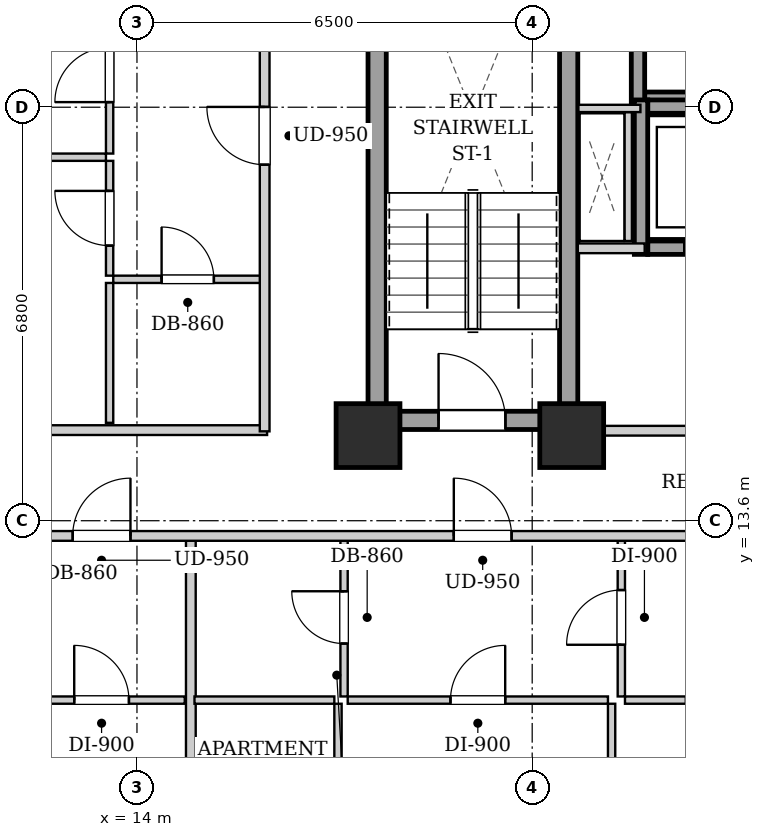
"""IFC4 building model, lengths in metres.
Left out: names, types, materials, properties, quantities, classifications, styles, units other than length and angle.
Written with IfcOpenShell. Run it as: python <this file> out.ifc"""

import sys

from ifc_helpers import new_model, si_unit, direction, frame, frame_2d, origin, origin_2d, place, context, subcontext, project, spatial, rectangle, extrude, element, fill, save


model = new_model("IFC4")
c1 = context("Model", 3, precision=1e-05, world=origin(), true_north=direction((0.0, 1.0)))
c2 = subcontext(c1, "Body", "Model", "MODEL_VIEW")
j1 = project(units=[si_unit("LENGTHUNIT", "METRE"), si_unit("PLANEANGLEUNIT", "RADIAN")], contexts=[c1])
p1 = place(None, origin())
s1 = spatial("IfcSite", under=j1, at=p1, CompositionType="ELEMENT")
p2 = place(p1, origin())
s2 = spatial("IfcBuilding", under=s1, at=p2, CompositionType="ELEMENT")
p3 = place(p2, frame((0.0, 0.0, 75.1)))
s3 = spatial("IfcBuildingStorey", under=s2, at=p3, CompositionType="ELEMENT", Elevation=75.1)
for number, where, z_axis, x_axis in (
    (1, (17.8, 15.0, 0.0), (0.0, 0.0, 1.0), (1.0, 0.0, 0.0)),
    (2, (21.15, 15.0, 0.0), (0.0, 0.0, 1.0), (1.0, 0.0, 0.0)),
):
    element("IfcColumn", number, at=place(p3, frame(where, z_axis=z_axis, x_axis=x_axis)), inside=s3, PredefinedType="COLUMN", context=c2, shape_type="SweptSolid", body=[
        extrude(rectangle(XDim=1.05, YDim=1.05, at=origin_2d()), origin(), (0.0, 0.0, 1.0), 3.2),
    ])
for number, where, z_axis, x_axis in (
    (3, (17.95, 15.1, 0.0), (0.0, 0.0, 1.0), (0.0, 1.0, 0.0)),
    (4, (21.1, 15.1, 0.0), (0.0, 0.0, 1.0), (0.0, 1.0, 0.0)),
):
    element("IfcWall", number, at=place(p3, frame(where, z_axis=z_axis, x_axis=x_axis)), inside=s3, PredefinedType="SHEAR", context=c2, shape_type="SweptSolid", body=[
        extrude(rectangle(XDim=9.0, YDim=0.3, at=frame_2d((4.5, 0.0))), origin(), (0.0, 0.0, 1.0), 2.94),
    ])
p4 = place(p3, frame((18.1, 15.25, 0.0), z_axis=(0.0, 0.0, 1.0), x_axis=(1.0, 0.0, 0.0)))
e5 = element("IfcWall", 5, at=p4, inside=s3, PredefinedType="SHEAR", context=c2, shape_type="SweptSolid", body=[
    extrude(rectangle(XDim=2.85, YDim=0.3, at=frame_2d((1.425, 0.0))), origin(), (0.0, 0.0, 1.0), 2.94),
])
p5 = place(p4, frame((0.86, 0.0, 0.0)))
e6 = element("IfcOpeningElement", 6, at=p5, cuts=e5, PredefinedType="OPENING", context=c2, shape_type="SweptSolid", body=[
    extrude(rectangle(XDim=1.1, YDim=2.05, at=frame_2d((0.55, 1.025))), frame((0.0, 0.16, 0.0), z_axis=(0.0, -1.0, 0.0), x_axis=(1.0, 0.0, 0.0)), (0.0, 0.0, 1.0), 0.32),
])
p6 = place(p3, frame((22.35, 20.54, 0.0), z_axis=(0.0, 0.0, 1.0), x_axis=(1.0, 0.0, 0.0)))
e7 = element("IfcWall", 7, at=p6, inside=s3, PredefinedType="SHEAR", context=c2, shape_type="SweptSolid", body=[
    extrude(rectangle(XDim=1.9, YDim=0.22, at=frame_2d((0.95, 0.0))), origin(), (0.0, 0.0, 1.0), 2.94),
])
p7 = place(p3, frame((22.24, 20.43, 0.0), z_axis=(0.0, 0.0, 1.0), x_axis=(0.0, 1.0, 0.0)))
e8 = element("IfcWall", 8, at=p7, inside=s3, PredefinedType="SHEAR", context=c2, shape_type="SweptSolid", body=[
    extrude(rectangle(XDim=2.44, YDim=0.22, at=frame_2d((1.22, 0.0))), origin(), (0.0, 0.0, 1.0), 2.94),
])
p8 = place(p3, frame((22.4, 18.09, 0.0), z_axis=(0.0, 0.0, 1.0), x_axis=(1.0, 0.0, 0.0)))
e9 = element("IfcWall", 9, at=p8, inside=s3, PredefinedType="SHEAR", context=c2, shape_type="SweptSolid", body=[
    extrude(rectangle(XDim=2.4, YDim=0.22, at=frame_2d((1.2, 0.0))), origin(), (0.0, 0.0, 1.0), 2.94),
])
p9 = place(p8, frame((0.6, 0.0, 0.0)))
e10 = element("IfcOpeningElement", 10, at=p9, cuts=e9, PredefinedType="OPENING", context=c2, shape_type="SweptSolid", body=[
    extrude(rectangle(XDim=1.2, YDim=2.15, at=frame_2d((0.6, 1.075))), frame((0.0, 0.12, 0.0), z_axis=(0.0, -1.0, 0.0), x_axis=(1.0, 0.0, 0.0)), (0.0, 0.0, 1.0), 0.24),
])
p10 = place(p3, frame((22.4, 20.41, 0.0), z_axis=(0.0, 0.0, 1.0), x_axis=(1.0, 0.0, 0.0)))
e11 = element("IfcWall", 11, at=p10, inside=s3, PredefinedType="SHEAR", context=c2, shape_type="SweptSolid", body=[
    extrude(rectangle(XDim=2.4, YDim=0.22, at=frame_2d((1.2, 0.0))), origin(), (0.0, 0.0, 1.0), 2.94),
])
p11 = place(p3, frame((22.29, 17.98, 0.0), z_axis=(0.0, 0.0, 1.0), x_axis=(0.0, 1.0, 0.0)))
e12 = element("IfcWall", 12, at=p11, inside=s3, PredefinedType="SHEAR", context=c2, shape_type="SweptSolid", body=[
    extrude(rectangle(XDim=2.54, YDim=0.22, at=frame_2d((1.27, 0.0))), origin(), (0.0, 0.0, 1.0), 2.94),
])
p12 = place(p3, frame((21.25, 15.08, 0.0), z_axis=(0.0, 0.0, 1.0), x_axis=(1.0, 0.0, 0.0)))
e13 = element("IfcWall", 13, at=p12, inside=s3, PredefinedType="PARTITIONING", context=c2, shape_type="SweptSolid", body=[
    extrude(rectangle(XDim=8.5, YDim=0.16, at=frame_2d((4.25, 0.0))), origin(), (0.0, 0.0, 1.0), 2.309),
])
p13 = place(p12, frame((3.725, 0.0, 0.0)))
e14 = element("IfcOpeningElement", 14, at=p13, cuts=e13, PredefinedType="OPENING", context=c2, shape_type="SweptSolid", body=[
    extrude(rectangle(XDim=1.05, YDim=2.05, at=frame_2d((0.525, 1.025))), frame((0.0, 0.09, 0.0), z_axis=(0.0, -1.0, 0.0), x_axis=(1.0, 0.0, 0.0)), (0.0, 0.0, 1.0), 0.18),
])
p14 = place(p3, frame((21.25, 18.08, 0.0), z_axis=(0.0, 0.0, 1.0), x_axis=(1.0, 0.0, 0.0)))
e15 = element("IfcWall", 15, at=p14, inside=s3, PredefinedType="PARTITIONING", context=c2, shape_type="SweptSolid", body=[
    extrude(rectangle(XDim=1.1, YDim=0.16, at=frame_2d((0.55, 0.0))), origin(), (0.0, 0.0, 1.0), 2.94),
])
p15 = place(p3, frame((22.08, 18.2, 0.0), z_axis=(0.0, 0.0, 1.0), x_axis=(0.0, 1.0, 0.0)))
e16 = element("IfcWall", 16, at=p15, inside=s3, PredefinedType="PARTITIONING", context=c2, shape_type="SweptSolid", body=[
    extrude(rectangle(XDim=2.12, YDim=0.12, at=frame_2d((1.06, 0.0))), origin(), (0.0, 0.0, 1.0), 2.94),
])
p16 = place(p3, frame((22.28, 20.38, 0.0), z_axis=(0.0, 0.0, 1.0), x_axis=(-1.0, 0.0, 0.0)))
e17 = element("IfcWall", 17, at=p16, inside=s3, PredefinedType="PARTITIONING", context=c2, shape_type="SweptSolid", body=[
    extrude(rectangle(XDim=1.02, YDim=0.12, at=frame_2d((0.51, 0.0))), origin(), (0.0, 0.0, 1.0), 2.94),
])
p17 = place(p3, frame((7.78, 15.09, 0.0), z_axis=(0.0, 0.0, 1.0), x_axis=(1.0, 0.0, 0.0)))
e18 = element("IfcWall", 18, at=p17, inside=s3, PredefinedType="PARTITIONING", context=c2, shape_type="SweptSolid", body=[
    extrude(rectangle(XDim=8.36, YDim=0.16, at=frame_2d((4.18, 0.0))), origin(), (0.0, 0.0, 1.0), 2.309),
])
p18 = place(p3, frame((12.05, 10.65, 0.0), z_axis=(0.0, 0.0, 1.0), x_axis=(1.0, 0.0, 0.0)))
e19 = element("IfcWall", 19, at=p18, inside=s3, PredefinedType="PARTITIONING", context=c2, shape_type="SweptSolid", body=[
    extrude(rectangle(XDim=2.736, YDim=0.12, at=frame_2d((1.368, 0.0))), origin(), (0.0, 0.0, 1.0), 2.94),
])
p19 = place(p18, frame((0.918, 0.0, 0.0)))
e20 = element("IfcOpeningElement", 20, at=p19, cuts=e19, PredefinedType="OPENING", context=c2, shape_type="SweptSolid", body=[
    extrude(rectangle(XDim=0.9, YDim=2.05, at=frame_2d((0.45, 1.025))), frame((0.0, 0.07, 0.0), z_axis=(0.0, -1.0, 0.0), x_axis=(1.0, 0.0, 0.0)), (0.0, 0.0, 1.0), 0.14),
])
p20 = place(p3, frame((14.886, 2.26, 0.0), z_axis=(0.0, 0.0, 1.0), x_axis=(0.0, 1.0, 0.0)))
e21 = element("IfcWall", 21, at=p20, inside=s3, PredefinedType="PARTITIONING", context=c2, shape_type="SweptSolid", body=[
    extrude(rectangle(XDim=11.05, YDim=0.16, at=frame_2d((5.525, 0.0))), origin(), (0.0, 0.0, 1.0), 2.94),
])
p21 = place(p3, frame((17.406, 10.71, 0.0), z_axis=(0.0, 0.0, 1.0), x_axis=(0.0, 1.0, 0.0)))
e22 = element("IfcWall", 22, at=p21, inside=s3, PredefinedType="PARTITIONING", context=c2, shape_type="SweptSolid", body=[
    extrude(rectangle(XDim=2.6, YDim=0.12, at=frame_2d((1.3, 0.0))), origin(), (0.0, 0.0, 1.0), 2.94),
])
p22 = place(p21, frame((0.87, 0.0, 0.0)))
e23 = element("IfcOpeningElement", 23, at=p22, cuts=e22, PredefinedType="OPENING", context=c2, shape_type="SweptSolid", body=[
    extrude(rectangle(XDim=0.86, YDim=2.05, at=frame_2d((0.43, 1.025))), frame((0.0, 0.07, 0.0), z_axis=(0.0, -1.0, 0.0), x_axis=(1.0, 0.0, 0.0)), (0.0, 0.0, 1.0), 0.14),
])
p23 = place(p3, frame((14.946, 10.65, 0.0), z_axis=(0.0, 0.0, 1.0), x_axis=(1.0, 0.0, 0.0)))
e24 = element("IfcWall", 24, at=p23, inside=s3, PredefinedType="PARTITIONING", context=c2, shape_type="SweptSolid", body=[
    extrude(rectangle(XDim=2.3, YDim=0.12, at=frame_2d((1.15, 0.0))), origin(), (0.0, 0.0, 1.0), 2.94),
])
p24 = place(p3, frame((21.966, 10.71, 0.0), z_axis=(0.0, 0.0, 1.0), x_axis=(0.0, 1.0, 0.0)))
e25 = element("IfcWall", 25, at=p24, inside=s3, PredefinedType="PARTITIONING", context=c2, shape_type="SweptSolid", body=[
    extrude(rectangle(XDim=2.6, YDim=0.12, at=frame_2d((1.3, 0.0))), origin(), (0.0, 0.0, 1.0), 2.94),
])
p25 = place(p24, frame((0.85, 0.0, 0.0)))
e26 = element("IfcOpeningElement", 26, at=p25, cuts=e25, PredefinedType="OPENING", context=c2, shape_type="SweptSolid", body=[
    extrude(rectangle(XDim=0.9, YDim=2.05, at=frame_2d((0.45, 1.025))), frame((0.0, 0.07, 0.0), z_axis=(0.0, -1.0, 0.0), x_axis=(1.0, 0.0, 0.0)), (0.0, 0.0, 1.0), 0.14),
])
p26 = place(p3, frame((17.466, 10.65, 0.0), z_axis=(0.0, 0.0, 1.0), x_axis=(1.0, 0.0, 0.0)))
e27 = element("IfcWall", 27, at=p26, inside=s3, PredefinedType="PARTITIONING", context=c2, shape_type="SweptSolid", body=[
    extrude(rectangle(XDim=4.28, YDim=0.12, at=frame_2d((2.14, 0.0))), origin(), (0.0, 0.0, 1.0), 2.94),
])
p27 = place(p26, frame((1.69, 0.0, 0.0)))
e28 = element("IfcOpeningElement", 28, at=p27, cuts=e27, PredefinedType="OPENING", context=c2, shape_type="SweptSolid", body=[
    extrude(rectangle(XDim=0.9, YDim=2.05, at=frame_2d((0.45, 1.025))), frame((0.0, 0.07, 0.0), z_axis=(0.0, -1.0, 0.0), x_axis=(1.0, 0.0, 0.0)), (0.0, 0.0, 1.0), 0.14),
])
p28 = place(p3, frame((22.026, 10.65, 0.0), z_axis=(0.0, 0.0, 1.0), x_axis=(1.0, 0.0, 0.0)))
e29 = element("IfcWall", 29, at=p28, inside=s3, PredefinedType="PARTITIONING", context=c2, shape_type="SweptSolid", body=[
    extrude(rectangle(XDim=2.905, YDim=0.12, at=frame_2d((1.453, 0.0))), origin(), (0.0, 0.0, 1.0), 2.94),
])
p29 = place(p28, frame((1.003, 0.0, 0.0)))
e30 = element("IfcOpeningElement", 30, at=p29, cuts=e29, PredefinedType="OPENING", context=c2, shape_type="SweptSolid", body=[
    extrude(rectangle(XDim=0.9, YDim=2.05, at=frame_2d((0.45, 1.025))), frame((0.0, 0.07, 0.0), z_axis=(0.0, -1.0, 0.0), x_axis=(1.0, 0.0, 0.0)), (0.0, 0.0, 1.0), 0.14),
])
p30 = place(p3, frame((17.306, 2.43, 0.0), z_axis=(0.0, 0.0, 1.0), x_axis=(0.0, 1.0, 0.0)))
e31 = element("IfcWall", 31, at=p30, inside=s3, PredefinedType="PARTITIONING", context=c2, shape_type="SweptSolid", body=[
    extrude(rectangle(XDim=8.16, YDim=0.12, at=frame_2d((4.08, 0.0))), origin(), (0.0, 0.0, 1.0), 2.94),
])
p31 = place(p30, frame((3.63, 0.0, 0.0)))
e32 = element("IfcOpeningElement", 32, at=p31, cuts=e31, PredefinedType="OPENING", context=c2, shape_type="SweptSolid", body=[
    extrude(rectangle(XDim=0.9, YDim=2.05, at=frame_2d((0.45, 1.025))), frame((0.0, 0.07, 0.0), z_axis=(0.0, -1.0, 0.0), x_axis=(1.0, 0.0, 0.0)), (0.0, 0.0, 1.0), 0.14),
])
p32 = place(p3, frame((21.806, 0.28, 0.0), z_axis=(0.0, 0.0, 1.0), x_axis=(0.0, 1.0, 0.0)))
e33 = element("IfcWall", 33, at=p32, inside=s3, PredefinedType="PARTITIONING", context=c2, shape_type="SweptSolid", body=[
    extrude(rectangle(XDim=10.31, YDim=0.12, at=frame_2d((5.155, 0.0))), origin(), (0.0, 0.0, 1.0), 2.94),
])
p33 = place(p32, frame((4.69, 0.0, 0.0)))
e34 = element("IfcOpeningElement", 34, at=p33, cuts=e33, PredefinedType="OPENING", context=c2, shape_type="SweptSolid", body=[
    extrude(rectangle(XDim=0.9, YDim=2.05, at=frame_2d((0.45, 1.025))), frame((0.0, 0.07, 0.0), z_axis=(0.0, -1.0, 0.0), x_axis=(1.0, 0.0, 0.0)), (0.0, 0.0, 1.0), 0.14),
])
p34 = place(p3, frame((13.61, 17.57, 0.0), z_axis=(0.0, 0.0, 1.0), x_axis=(1.0, 0.0, 0.0)))
e35 = element("IfcWall", 35, at=p34, inside=s3, PredefinedType="PARTITIONING", context=c2, shape_type="SweptSolid", body=[
    extrude(rectangle(XDim=2.45, YDim=0.12, at=frame_2d((1.225, 0.0))), origin(), (0.0, 0.0, 1.0), 2.94),
])
p35 = place(p34, frame((0.795, 0.0, 0.0)))
e36 = element("IfcOpeningElement", 36, at=p35, cuts=e35, PredefinedType="OPENING", context=c2, shape_type="SweptSolid", body=[
    extrude(rectangle(XDim=0.86, YDim=2.05, at=frame_2d((0.43, 1.025))), frame((0.0, 0.07, 0.0), z_axis=(0.0, -1.0, 0.0), x_axis=(1.0, 0.0, 0.0)), (0.0, 0.0, 1.0), 0.14),
])
p36 = place(p3, frame((13.55, 15.21, 0.0), z_axis=(0.0, 0.0, 1.0), x_axis=(0.0, 1.0, 0.0)))
e37 = element("IfcWall", 37, at=p36, inside=s3, PredefinedType="PARTITIONING", context=c2, shape_type="SweptSolid", body=[
    extrude(rectangle(XDim=2.3, YDim=0.12, at=frame_2d((1.15, 0.0))), origin(), (0.0, 0.0, 1.0), 2.94),
])
p37 = place(p3, frame((13.55, 17.63, 0.0), z_axis=(0.0, 0.0, 1.0), x_axis=(0.0, 1.0, 0.0)))
e38 = element("IfcWall", 38, at=p37, inside=s3, PredefinedType="PARTITIONING", context=c2, shape_type="SweptSolid", body=[
    extrude(rectangle(XDim=1.888, YDim=0.12, at=frame_2d((0.944, 0.0))), origin(), (0.0, 0.0, 1.0), 2.94),
])
p38 = place(p37, frame((0.494, 0.0, 0.0)))
e39 = element("IfcOpeningElement", 39, at=p38, cuts=e38, PredefinedType="OPENING", context=c2, shape_type="SweptSolid", body=[
    extrude(rectangle(XDim=0.9, YDim=2.05, at=frame_2d((0.45, 1.025))), frame((0.0, 0.07, 0.0), z_axis=(0.0, -1.0, 0.0), x_axis=(1.0, 0.0, 0.0)), (0.0, 0.0, 1.0), 0.14),
])
p39 = place(p3, frame((13.55, 19.638, 0.0), z_axis=(0.0, 0.0, 1.0), x_axis=(0.0, 1.0, 0.0)))
e40 = element("IfcWall", 40, at=p39, inside=s3, PredefinedType="PARTITIONING", context=c2, shape_type="SweptSolid", body=[
    extrude(rectangle(XDim=2.592, YDim=0.12, at=frame_2d((1.296, 0.0))), origin(), (0.0, 0.0, 1.0), 2.94),
])
p40 = place(p39, frame((0.846, 0.0, 0.0)))
e41 = element("IfcOpeningElement", 41, at=p40, cuts=e40, PredefinedType="OPENING", context=c2, shape_type="SweptSolid", body=[
    extrude(rectangle(XDim=0.9, YDim=2.05, at=frame_2d((0.45, 1.025))), frame((0.0, 0.07, 0.0), z_axis=(0.0, -1.0, 0.0), x_axis=(1.0, 0.0, 0.0)), (0.0, 0.0, 1.0), 0.14),
])
p41 = place(p3, frame((9.93, 19.578, 0.0), z_axis=(0.0, 0.0, 1.0), x_axis=(1.0, 0.0, 0.0)))
e42 = element("IfcWall", 42, at=p41, inside=s3, PredefinedType="PARTITIONING", context=c2, shape_type="SweptSolid", body=[
    extrude(rectangle(XDim=3.56, YDim=0.12, at=frame_2d((1.78, 0.0))), origin(), (0.0, 0.0, 1.0), 2.94),
])
p42 = place(p41, frame((1.33, 0.0, 0.0)))
e43 = element("IfcOpeningElement", 43, at=p42, cuts=e42, PredefinedType="OPENING", context=c2, shape_type="SweptSolid", body=[
    extrude(rectangle(XDim=0.9, YDim=2.05, at=frame_2d((0.45, 1.025))), frame((0.0, 0.07, 0.0), z_axis=(0.0, -1.0, 0.0), x_axis=(1.0, 0.0, 0.0)), (0.0, 0.0, 1.0), 0.14),
])
p43 = place(p3, frame((10.05, 13.35, 0.0), z_axis=(0.0, 0.0, 1.0), x_axis=(1.0, 0.0, 0.0)))
e44 = element("IfcWall", 44, at=p43, inside=s3, PredefinedType="PARTITIONING", context=c2, shape_type="SweptSolid", body=[
    extrude(rectangle(XDim=30.8, YDim=0.16, at=frame_2d((15.4, 0.0))), origin(), (0.0, 0.0, 1.0), 2.94),
])
p44 = place(p43, frame((2.893, 0.0, 0.0)))
e45 = element("IfcOpeningElement", 45, at=p44, cuts=e44, PredefinedType="OPENING", context=c2, shape_type="SweptSolid", body=[
    extrude(rectangle(XDim=0.95, YDim=2.1, at=frame_2d((0.475, 1.05))), frame((0.0, 0.09, 0.0), z_axis=(0.0, -1.0, 0.0), x_axis=(1.0, 0.0, 0.0)), (0.0, 0.0, 1.0), 0.18),
])
p45 = place(p43, frame((9.161, 0.0, 0.0)))
e46 = element("IfcOpeningElement", 46, at=p45, cuts=e44, PredefinedType="OPENING", context=c2, shape_type="SweptSolid", body=[
    extrude(rectangle(XDim=0.95, YDim=2.1, at=frame_2d((0.475, 1.05))), frame((0.0, 0.09, 0.0), z_axis=(0.0, -1.0, 0.0), x_axis=(1.0, 0.0, 0.0)), (0.0, 0.0, 1.0), 0.18),
])
p46 = place(p43, frame((26.306, 0.0, 0.0)))
e47 = element("IfcOpeningElement", 47, at=p46, cuts=e44, PredefinedType="OPENING", context=c2, shape_type="SweptSolid", body=[
    extrude(rectangle(XDim=0.95, YDim=2.1, at=frame_2d((0.475, 1.05))), frame((0.0, 0.09, 0.0), z_axis=(0.0, -1.0, 0.0), x_axis=(1.0, 0.0, 0.0)), (0.0, 0.0, 1.0), 0.18),
])
p47 = place(p3, frame((16.1, 15.07, 0.0), z_axis=(0.0, 0.0, 1.0), x_axis=(0.0, 1.0, 0.0)))
e48 = element("IfcWall", 48, at=p47, inside=s3, PredefinedType="PARTITIONING", context=c2, shape_type="SweptSolid", body=[
    extrude(rectangle(XDim=13.93, YDim=0.16, at=frame_2d((6.965, 0.0))), origin(), (0.0, 0.0, 1.0), 2.94),
])
p48 = place(p47, frame((4.385, 0.0, 0.0)))
e49 = element("IfcOpeningElement", 49, at=p48, cuts=e48, PredefinedType="OPENING", context=c2, shape_type="SweptSolid", body=[
    extrude(rectangle(XDim=0.95, YDim=2.1, at=frame_2d((0.475, 1.05))), frame((0.0, 0.09, 0.0), z_axis=(0.0, -1.0, 0.0), x_axis=(1.0, 0.0, 0.0)), (0.0, 0.0, 1.0), 0.18),
])
p49 = place(p5, origin())
e50 = element("IfcDoor", 50, at=p49, inside=s3, OperationType="SINGLE_SWING_LEFT", PredefinedType="DOOR", context=c2, shape_type="SweptSolid", body=[
    extrude(rectangle(XDim=1.1, YDim=2.05, at=frame_2d((0.55, 1.025))), frame((0.0, 0.025, 0.0), z_axis=(0.0, -1.0, 0.0), x_axis=(1.0, 0.0, 0.0)), (0.0, 0.0, 1.0), 0.05),
])
fill(e6, e50)
p50 = place(p9, origin())
e51 = element("IfcDoor", 51, at=p50, inside=s3, OperationType="SLIDING_TO_LEFT", PredefinedType="DOOR", context=c2, shape_type="SweptSolid", body=[
    extrude(rectangle(XDim=1.2, YDim=2.15, at=frame_2d((0.6, 1.075))), frame((0.0, 0.025, 0.0), z_axis=(0.0, -1.0, 0.0), x_axis=(1.0, 0.0, 0.0)), (0.0, 0.0, 1.0), 0.05),
])
fill(e10, e51)
p51 = place(p19, origin())
e52 = element("IfcDoor", 52, at=p51, inside=s3, OperationType="SINGLE_SWING_LEFT", PredefinedType="DOOR", context=c2, shape_type="SweptSolid", body=[
    extrude(rectangle(XDim=0.9, YDim=2.05, at=frame_2d((0.45, 1.025))), frame((0.0, 0.025, 0.0), z_axis=(0.0, -1.0, 0.0), x_axis=(1.0, 0.0, 0.0)), (0.0, 0.0, 1.0), 0.05),
])
fill(e20, e52)
p52 = place(p22, origin())
e53 = element("IfcDoor", 53, at=p52, inside=s3, OperationType="SINGLE_SWING_RIGHT", PredefinedType="DOOR", context=c2, shape_type="SweptSolid", body=[
    extrude(rectangle(XDim=0.86, YDim=2.05, at=frame_2d((0.43, 1.025))), frame((0.0, 0.025, 0.0), z_axis=(0.0, -1.0, 0.0), x_axis=(1.0, 0.0, 0.0)), (0.0, 0.0, 1.0), 0.05),
])
fill(e23, e53)
p53 = place(p25, origin())
e54 = element("IfcDoor", 54, at=p53, inside=s3, OperationType="SINGLE_SWING_LEFT", PredefinedType="DOOR", context=c2, shape_type="SweptSolid", body=[
    extrude(rectangle(XDim=0.9, YDim=2.05, at=frame_2d((0.45, 1.025))), frame((0.0, 0.025, 0.0), z_axis=(0.0, -1.0, 0.0), x_axis=(1.0, 0.0, 0.0)), (0.0, 0.0, 1.0), 0.05),
])
fill(e26, e54)
p54 = place(p27, origin())
e55 = element("IfcDoor", 55, at=p54, inside=s3, OperationType="SINGLE_SWING_RIGHT", PredefinedType="DOOR", context=c2, shape_type="SweptSolid", body=[
    extrude(rectangle(XDim=0.9, YDim=2.05, at=frame_2d((0.45, 1.025))), frame((0.0, 0.025, 0.0), z_axis=(0.0, -1.0, 0.0), x_axis=(1.0, 0.0, 0.0)), (0.0, 0.0, 1.0), 0.05),
])
fill(e28, e55)
p55 = place(p35, origin())
e56 = element("IfcDoor", 56, at=p55, inside=s3, OperationType="SINGLE_SWING_LEFT", PredefinedType="DOOR", context=c2, shape_type="SweptSolid", body=[
    extrude(rectangle(XDim=0.86, YDim=2.05, at=frame_2d((0.43, 1.025))), frame((0.0, 0.025, 0.0), z_axis=(0.0, -1.0, 0.0), x_axis=(1.0, 0.0, 0.0)), (0.0, 0.0, 1.0), 0.05),
])
fill(e36, e56)
p56 = place(p38, origin())
e57 = element("IfcDoor", 57, at=p56, inside=s3, OperationType="SINGLE_SWING_RIGHT", PredefinedType="DOOR", context=c2, shape_type="SweptSolid", body=[
    extrude(rectangle(XDim=0.9, YDim=2.05, at=frame_2d((0.45, 1.025))), frame((0.0, 0.025, 0.0), z_axis=(0.0, -1.0, 0.0), x_axis=(1.0, 0.0, 0.0)), (0.0, 0.0, 1.0), 0.05),
])
fill(e39, e57)
p57 = place(p40, origin())
e58 = element("IfcDoor", 58, at=p57, inside=s3, OperationType="SINGLE_SWING_LEFT", PredefinedType="DOOR", context=c2, shape_type="SweptSolid", body=[
    extrude(rectangle(XDim=0.9, YDim=2.05, at=frame_2d((0.45, 1.025))), frame((0.0, 0.025, 0.0), z_axis=(0.0, -1.0, 0.0), x_axis=(1.0, 0.0, 0.0)), (0.0, 0.0, 1.0), 0.05),
])
fill(e41, e58)
p58 = place(p44, origin())
e59 = element("IfcDoor", 59, at=p58, inside=s3, OperationType="SINGLE_SWING_RIGHT", PredefinedType="DOOR", context=c2, shape_type="SweptSolid", body=[
    extrude(rectangle(XDim=0.95, YDim=2.1, at=frame_2d((0.475, 1.05))), frame((0.0, 0.025, 0.0), z_axis=(0.0, -1.0, 0.0), x_axis=(1.0, 0.0, 0.0)), (0.0, 0.0, 1.0), 0.05),
])
fill(e45, e59)
p59 = place(p45, origin())
e60 = element("IfcDoor", 60, at=p59, inside=s3, OperationType="SINGLE_SWING_LEFT", PredefinedType="DOOR", context=c2, shape_type="SweptSolid", body=[
    extrude(rectangle(XDim=0.95, YDim=2.1, at=frame_2d((0.475, 1.05))), frame((0.0, 0.025, 0.0), z_axis=(0.0, -1.0, 0.0), x_axis=(1.0, 0.0, 0.0)), (0.0, 0.0, 1.0), 0.05),
])
fill(e46, e60)
p60 = place(p48, origin())
e61 = element("IfcDoor", 61, at=p60, inside=s3, OperationType="SINGLE_SWING_RIGHT", PredefinedType="DOOR", context=c2, shape_type="SweptSolid", body=[
    extrude(rectangle(XDim=0.95, YDim=2.1, at=frame_2d((0.475, 1.05))), frame((0.0, 0.025, 0.0), z_axis=(0.0, -1.0, 0.0), x_axis=(1.0, 0.0, 0.0)), (0.0, 0.0, 1.0), 0.05),
])
fill(e49, e61)
save(model, sys.argv[1])
